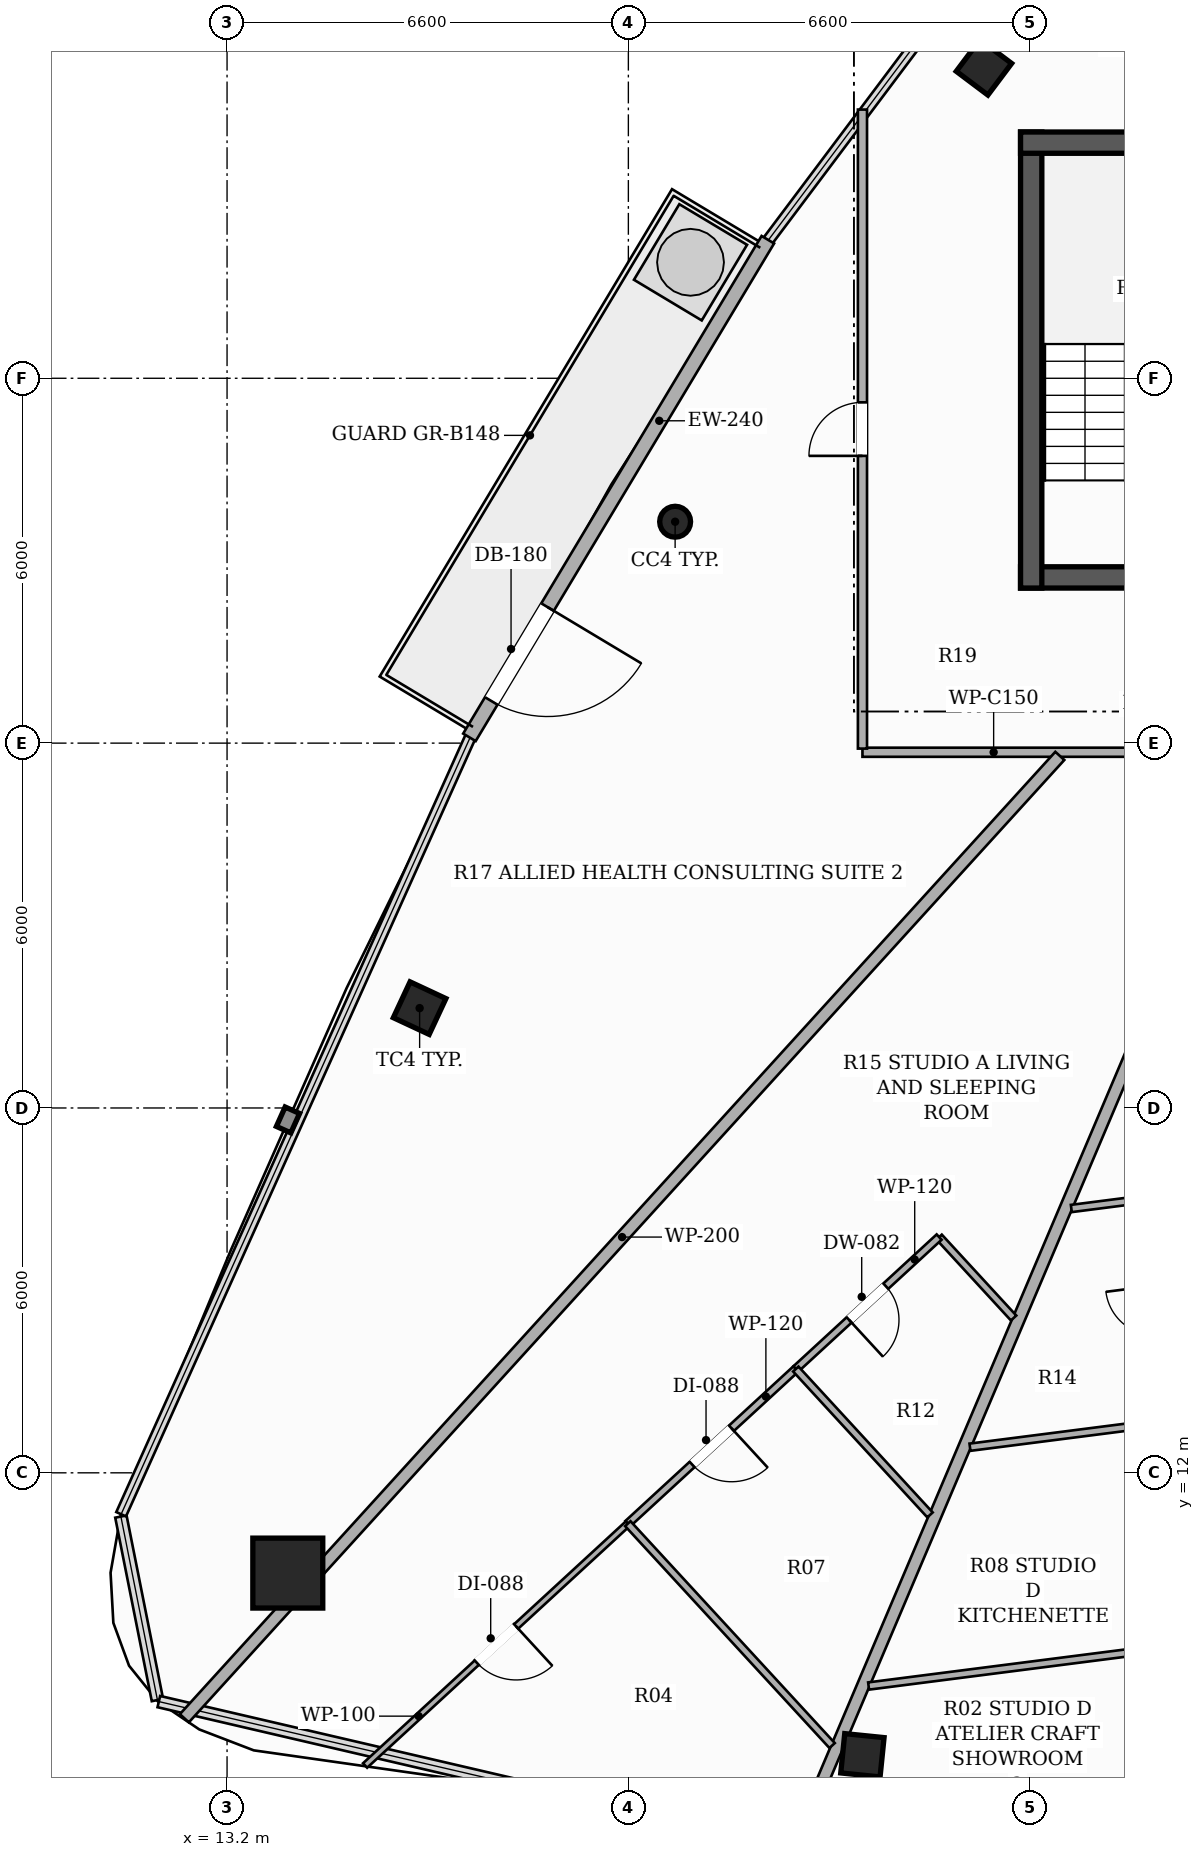
"""IFC4 building model, lengths in metres.
Left out: names, types, materials, properties, quantities, classifications, styles, units other than length and angle.
Written with IfcOpenShell. Run it as: python <this file> out.ifc"""

import sys

from ifc_helpers import new_model, si_unit, direction, frame, frame_2d, origin, origin_2d, place, context, subcontext, project, spatial, rectangle, hollow_rectangle, hollow_circle, extrude, element, fill, save


model = new_model("IFC4")
c1 = context("Model", 3, precision=1e-05, world=origin(), true_north=direction((0.0, 1.0)))
c2 = subcontext(c1, "Body", "Model", "MODEL_VIEW")
j1 = project(units=[si_unit("LENGTHUNIT", "METRE"), si_unit("PLANEANGLEUNIT", "RADIAN")], contexts=[c1])
p1 = place(None, origin())
s1 = spatial("IfcSite", under=j1, at=p1, CompositionType="ELEMENT")
p2 = place(p1, origin())
s2 = spatial("IfcBuilding", under=s1, at=p2, CompositionType="ELEMENT")
p3 = place(p2, frame((0.0, 0.0, 273.35)))
s3 = spatial("IfcBuildingStorey", under=s2, at=p3, CompositionType="ELEMENT", Elevation=273.35)
p4 = place(p3, frame((26.25, 26.725, 0.0), z_axis=(0.0, 0.0, 1.0), x_axis=(1.0, 0.0, 0.0)))
e1 = element("IfcWall", 1, at=p4, inside=s3, PredefinedType="SHEAR", context=c2, shape_type="SweptSolid", body=[
    extrude(rectangle(XDim=13.5, YDim=0.35, at=frame_2d((6.75, 0.0))), origin(), (0.0, 0.0, 1.0), 3.3),
])
p5 = place(p4, frame((4.35, 0.0, 0.0)))
e2 = element("IfcOpeningElement", 2, at=p5, cuts=e1, PredefinedType="OPENING", context=c2, shape_type="SweptSolid", body=[
    extrude(rectangle(XDim=1.05, YDim=2.15, at=frame_2d((0.525, 1.075))), frame((0.0, 0.185, 0.0), z_axis=(0.0, -1.0, 0.0), x_axis=(1.0, 0.0, 0.0)), (0.0, 0.0, 1.0), 0.37),
])
p6 = place(p4, frame((8.3, 0.0, 0.0)))
e3 = element("IfcOpeningElement", 3, at=p6, cuts=e1, PredefinedType="OPENING", context=c2, shape_type="SweptSolid", body=[
    extrude(rectangle(XDim=1.05, YDim=2.15, at=frame_2d((0.525, 1.075))), frame((0.0, 0.185, 0.0), z_axis=(0.0, -1.0, 0.0), x_axis=(1.0, 0.0, 0.0)), (0.0, 0.0, 1.0), 0.37),
])
p7 = place(p3, frame((26.425, 26.55, 0.0), z_axis=(0.0, 0.0, 1.0), x_axis=(0.0, 1.0, 0.0)))
e4 = element("IfcWall", 4, at=p7, inside=s3, PredefinedType="SHEAR", context=c2, shape_type="SweptSolid", body=[
    extrude(rectangle(XDim=7.5, YDim=0.35, at=frame_2d((3.75, 0.0))), origin(), (0.0, 0.0, 1.0), 3.3),
])
p8 = place(p3, frame((26.25, 33.875, 0.0), z_axis=(0.0, 0.0, 1.0), x_axis=(1.0, 0.0, 0.0)))
e5 = element("IfcWall", 5, at=p8, inside=s3, PredefinedType="SHEAR", context=c2, shape_type="SweptSolid", body=[
    extrude(rectangle(XDim=3.6, YDim=0.35, at=frame_2d((1.8, 0.0))), origin(), (0.0, 0.0, 1.0), 3.3),
])
p9 = place(p3, frame((14.199, 10.351, 0.0), z_axis=(0.0, 0.0, 1.0), x_axis=(1.0, 0.0, 0.0)))
e6 = element("IfcColumn", 6, at=p9, inside=s3, PredefinedType="COLUMN", context=c2, shape_type="SweptSolid", body=[
    extrude(hollow_rectangle(XDim=1.15, YDim=1.15, WallThickness=0.036, at=origin_2d()), origin(), (0.0, 0.0, 1.0), 3.3),
])
p10 = place(p3, frame((25.648, 35.113, 0.0), z_axis=(0.0, 0.0, 1.0), x_axis=(0.600420225326, 0.799684658487, 0.0)))
e7 = element("IfcColumn", 7, at=p10, inside=s3, PredefinedType="COLUMN", context=c2, shape_type="SweptSolid", body=[
    extrude(hollow_rectangle(XDim=0.65, YDim=0.65, WallThickness=0.022, at=origin_2d()), origin(), (0.0, 0.0, 1.0), 3.3),
])
p11 = place(p3, frame((20.569, 27.641, 0.0), z_axis=(0.0, 0.0, 1.0), x_axis=(1.0, 0.0, 0.0)))
e8 = element("IfcColumn", 8, at=p11, inside=s3, PredefinedType="COLUMN", context=c2, shape_type="SweptSolid", body=[
    extrude(hollow_circle(Radius=0.254, WallThickness=0.016, at=origin_2d()), origin(), (0.0, 0.0, 1.0), 3.3),
])
for number, where, z_axis, x_axis in (
    (9, (16.367, 19.642, 0.0), (0.0, 0.0, 1.0), (0.423, 0.906, 0.0)),
    (10, (23.649, 7.355, 0.0), (0.0, 0.0, 1.0), (-0.995, 0.101, 0.0)),
):
    element("IfcColumn", number, at=place(p3, frame(where, z_axis=z_axis, x_axis=x_axis)), inside=s3, PredefinedType="COLUMN", context=c2, shape_type="SweptSolid", body=[
        extrude(hollow_rectangle(XDim=0.65, YDim=0.65, WallThickness=0.022, at=origin_2d()), origin(), (0.0, 0.0, 1.0), 3.3),
    ])
p12 = place(p3, frame((22.094, 32.279, 0.0), z_axis=(0.0, 0.0, 1.0), x_axis=(-0.514303866757, -0.857608029719, 0.0)))
e11 = element("IfcWall", 11, at=p12, inside=s3, PredefinedType="SOLIDWALL", context=c2, shape_type="SweptSolid", body=[
    extrude(rectangle(XDim=9.543, YDim=0.24, at=frame_2d((4.771, 0.0))), origin(), (0.0, 0.0, 1.0), 2.584),
])
p13 = place(p12, frame((7.045, 0.0, 0.0)))
e12 = element("IfcOpeningElement", 12, at=p13, cuts=e11, PredefinedType="OPENING", context=c2, shape_type="SweptSolid", body=[
    extrude(rectangle(XDim=1.8, YDim=2.2, at=frame_2d((0.9, 1.1))), frame((0.0, 0.13, 0.0), z_axis=(0.0, -1.0, 0.0), x_axis=(1.0, 0.0, 0.0)), (0.0, 0.0, 1.0), 0.26),
])
p14 = place(p3, frame((32.168, 23.85, 0.0), z_axis=(0.0, 0.0, 1.0), x_axis=(-1.0, 0.0, 0.0)))
e13 = element("IfcWall", 13, at=p14, inside=s3, PredefinedType="PARTITIONING", context=c2, shape_type="SweptSolid", body=[
    extrude(rectangle(XDim=8.518, YDim=0.15, at=frame_2d((4.259, 0.0))), origin(), (0.0, 0.0, 1.0), 2.525),
])
p15 = place(p14, frame((3.183, 0.0, 0.0)))
e14 = element("IfcOpeningElement", 14, at=p15, cuts=e13, PredefinedType="OPENING", context=c2, shape_type="SweptSolid", body=[
    extrude(rectangle(XDim=0.92, YDim=2.15, at=frame_2d((0.46, 1.075))), frame((0.0, 0.085, 0.0), z_axis=(0.0, -1.0, 0.0), x_axis=(1.0, 0.0, 0.0)), (0.0, 0.0, 1.0), 0.17),
])
p16 = place(p14, frame((0.882, 0.0, 0.0)))
e15 = element("IfcOpeningElement", 15, at=p16, cuts=e13, PredefinedType="OPENING", context=c2, shape_type="SweptSolid", body=[
    extrude(rectangle(XDim=0.92, YDim=2.15, at=frame_2d((0.46, 1.075))), frame((0.0, 0.085, 0.0), z_axis=(0.0, -1.0, 0.0), x_axis=(1.0, 0.0, 0.0)), (0.0, 0.0, 1.0), 0.17),
])
p17 = place(p3, frame((23.65, 23.91, 0.0), z_axis=(0.0, 0.0, 1.0), x_axis=(0.0, 1.0, 0.0)))
e16 = element("IfcWall", 16, at=p17, inside=s3, PredefinedType="PARTITIONING", context=c2, shape_type="SweptSolid", body=[
    extrude(rectangle(XDim=10.509, YDim=0.15, at=frame_2d((5.254, 0.0))), origin(), (0.0, 0.0, 1.0), 2.452),
])
p18 = place(p17, frame((4.814, 0.0, 0.0)))
e17 = element("IfcOpeningElement", 17, at=p18, cuts=e16, PredefinedType="OPENING", context=c2, shape_type="SweptSolid", body=[
    extrude(rectangle(XDim=0.88, YDim=2.1, at=frame_2d((0.44, 1.05))), frame((0.0, 0.085, 0.0), z_axis=(0.0, -1.0, 0.0), x_axis=(1.0, 0.0, 0.0)), (0.0, 0.0, 1.0), 0.17),
])
p19 = place(p3, frame((26.896, 23.79, 0.0), z_axis=(0.0, 0.0, 1.0), x_axis=(-0.672947642337, -0.739690118004, 0.0)))
e18 = element("IfcWall", 18, at=p19, inside=s3, PredefinedType="PARTITIONING", context=c2, shape_type="SweptSolid", body=[
    extrude(rectangle(XDim=21.395, YDim=0.2, at=frame_2d((10.698, 0.0))), origin(), (0.0, 0.0, 1.0), 2.452),
])
p20 = place(p3, frame((30.152, 23.79, 0.0), z_axis=(0.0, 0.0, 1.0), x_axis=(-0.390757480658, -0.920493667175, 0.0)))
e19 = element("IfcWall", 19, at=p20, inside=s3, PredefinedType="PARTITIONING", context=c2, shape_type="SweptSolid", body=[
    extrude(rectangle(XDim=19.053, YDim=0.2, at=frame_2d((9.526, 0.0))), origin(), (0.0, 0.0, 1.0), 2.452),
])
p21 = place(p3, frame((26.136, 14.546, 0.0), z_axis=(0.0, 0.0, 1.0), x_axis=(-0.67721439392, 0.735785746443, 0.0)))
e20 = element("IfcWall", 20, at=p21, inside=s3, PredefinedType="PARTITIONING", context=c2, shape_type="SweptSolid", body=[
    extrude(rectangle(XDim=1.809, YDim=0.12, at=frame_2d((0.905, 0.0))), origin(), (0.0, 0.0, 1.0), 2.733),
])
p22 = place(p3, frame((24.911, 15.877, 0.0), z_axis=(0.0, 0.0, 1.0), x_axis=(-0.735690989841, -0.677317331438, 0.0)))
e21 = element("IfcWall", 21, at=p22, inside=s3, PredefinedType="PARTITIONING", context=c2, shape_type="SweptSolid", body=[
    extrude(rectangle(XDim=3.204, YDim=0.12, at=frame_2d((1.602, 0.0))), origin(), (0.0, 0.0, 1.0), 3.02),
])
p23 = place(p22, frame((1.192, 0.0, 0.0)))
e22 = element("IfcOpeningElement", 22, at=p23, cuts=e21, PredefinedType="OPENING", context=c2, shape_type="SweptSolid", body=[
    extrude(rectangle(XDim=0.82, YDim=2.1, at=frame_2d((0.41, 1.05))), frame((0.0, 0.07, 0.0), z_axis=(0.0, -1.0, 0.0), x_axis=(1.0, 0.0, 0.0)), (0.0, 0.0, 1.0), 0.14),
])
p24 = place(p3, frame((22.554, 13.707, 0.0), z_axis=(0.0, 0.0, 1.0), x_axis=(-0.735789751444, -0.677210042506, 0.0)))
e23 = element("IfcWall", 23, at=p24, inside=s3, PredefinedType="PARTITIONING", context=c2, shape_type="SweptSolid", body=[
    extrude(rectangle(XDim=3.755, YDim=0.12, at=frame_2d((1.877, 0.0))), origin(), (0.0, 0.0, 1.0), 2.733),
])
p25 = place(p24, frame((1.438, 0.0, 0.0)))
e24 = element("IfcOpeningElement", 24, at=p25, cuts=e23, PredefinedType="OPENING", context=c2, shape_type="SweptSolid", body=[
    extrude(rectangle(XDim=0.88, YDim=2.1, at=frame_2d((0.44, 1.05))), frame((0.0, 0.07, 0.0), z_axis=(0.0, -1.0, 0.0), x_axis=(1.0, 0.0, 0.0)), (0.0, 0.0, 1.0), 0.14),
])
p26 = place(p3, frame((19.791, 11.164, 0.0), z_axis=(0.0, 0.0, 1.0), x_axis=(-0.735787653784, -0.677212321608, 0.0)))
e25 = element("IfcWall", 25, at=p26, inside=s3, PredefinedType="PARTITIONING", context=c2, shape_type="SweptSolid", body=[
    extrude(rectangle(XDim=5.873, YDim=0.1, at=frame_2d((2.936, 0.0))), origin(), (0.0, 0.0, 1.0), 2.452),
])
p27 = place(p26, frame((2.496, 0.0, 0.0)))
e26 = element("IfcOpeningElement", 26, at=p27, cuts=e25, PredefinedType="OPENING", context=c2, shape_type="SweptSolid", body=[
    extrude(rectangle(XDim=0.88, YDim=2.1, at=frame_2d((0.44, 1.05))), frame((0.0, 0.06, 0.0), z_axis=(0.0, -1.0, 0.0), x_axis=(1.0, 0.0, 0.0)), (0.0, 0.0, 1.0), 0.12),
])
p28 = place(p3, frame((24.761, 11.308, 0.0), z_axis=(0.0, 0.0, 1.0), x_axis=(-0.677059775875, 0.735928026299, 0.0)))
e27 = element("IfcWall", 27, at=p28, inside=s3, PredefinedType="PARTITIONING", context=c2, shape_type="SweptSolid", body=[
    extrude(rectangle(XDim=3.26, YDim=0.12, at=frame_2d((1.63, 0.0))), origin(), (0.0, 0.0, 1.0), 2.733),
])
p29 = place(p3, frame((23.151, 7.515, 0.0), z_axis=(0.0, 0.0, 1.0), x_axis=(-0.677343302262, 0.735667078834, 0.0)))
e28 = element("IfcWall", 28, at=p29, inside=s3, PredefinedType="PARTITIONING", context=c2, shape_type="SweptSolid", body=[
    extrude(rectangle(XDim=4.96, YDim=0.12, at=frame_2d((2.48, 0.0))), origin(), (0.0, 0.0, 1.0), 2.452),
])
p30 = place(p3, frame((28.285, 16.501, 0.0), z_axis=(0.0, 0.0, 1.0), x_axis=(-0.991859459137, -0.127337399535, 0.0)))
e29 = element("IfcWall", 29, at=p30, inside=s3, PredefinedType="PARTITIONING", context=c2, shape_type="SweptSolid", body=[
    extrude(rectangle(XDim=1.21, YDim=0.12, at=frame_2d((0.605, 0.0))), origin(), (0.0, 0.0, 1.0), 3.02),
])
p31 = place(p3, frame((28.753, 12.848, 0.0), z_axis=(0.0, 0.0, 1.0), x_axis=(-0.991902552373, -0.127001285805, 0.0)))
e30 = element("IfcWall", 30, at=p31, inside=s3, PredefinedType="PARTITIONING", context=c2, shape_type="SweptSolid", body=[
    extrude(rectangle(XDim=3.362, YDim=0.12, at=frame_2d((1.681, 0.0))), origin(), (0.0, 0.0, 1.0), 2.733),
])
p32 = place(p3, frame((29.222, 9.195, 0.0), z_axis=(0.0, 0.0, 1.0), x_axis=(-0.991886960484, -0.127123001942, 0.0)))
e31 = element("IfcWall", 31, at=p32, inside=s3, PredefinedType="PARTITIONING", context=c2, shape_type="SweptSolid", body=[
    extrude(rectangle(XDim=5.516, YDim=0.12, at=frame_2d((2.758, 0.0))), origin(), (0.0, 0.0, 1.0), 2.733),
])
p33 = place(p13, origin())
e32 = element("IfcDoor", 32, at=p33, inside=s3, OperationType="SINGLE_SWING_LEFT", PredefinedType="DOOR", context=c2, shape_type="SweptSolid", body=[
    extrude(rectangle(XDim=1.8, YDim=2.2, at=frame_2d((0.9, 1.1))), frame((0.0, 0.025, 0.0), z_axis=(0.0, -1.0, 0.0), x_axis=(1.0, 0.0, 0.0)), (0.0, 0.0, 1.0), 0.05),
])
fill(e12, e32)
p34 = place(p18, origin())
e33 = element("IfcDoor", 33, at=p34, inside=s3, OperationType="SINGLE_SWING_LEFT", PredefinedType="DOOR", context=c2, shape_type="SweptSolid", body=[
    extrude(rectangle(XDim=0.88, YDim=2.1, at=frame_2d((0.44, 1.05))), frame((0.0, 0.025, 0.0), z_axis=(0.0, -1.0, 0.0), x_axis=(1.0, 0.0, 0.0)), (0.0, 0.0, 1.0), 0.05),
])
fill(e17, e33)
p35 = place(p23, origin())
e34 = element("IfcDoor", 34, at=p35, inside=s3, OperationType="SINGLE_SWING_RIGHT", PredefinedType="DOOR", context=c2, shape_type="SweptSolid", body=[
    extrude(rectangle(XDim=0.82, YDim=2.1, at=frame_2d((0.41, 1.05))), frame((0.0, 0.025, 0.0), z_axis=(0.0, -1.0, 0.0), x_axis=(1.0, 0.0, 0.0)), (0.0, 0.0, 1.0), 0.05),
])
fill(e22, e34)
p36 = place(p25, origin())
e35 = element("IfcDoor", 35, at=p36, inside=s3, OperationType="SINGLE_SWING_LEFT", PredefinedType="DOOR", context=c2, shape_type="SweptSolid", body=[
    extrude(rectangle(XDim=0.88, YDim=2.1, at=frame_2d((0.44, 1.05))), frame((0.0, 0.025, 0.0), z_axis=(0.0, -1.0, 0.0), x_axis=(1.0, 0.0, 0.0)), (0.0, 0.0, 1.0), 0.05),
])
fill(e24, e35)
p37 = place(p27, origin())
e36 = element("IfcDoor", 36, at=p37, inside=s3, OperationType="SINGLE_SWING_LEFT", PredefinedType="DOOR", context=c2, shape_type="SweptSolid", body=[
    extrude(rectangle(XDim=0.88, YDim=2.1, at=frame_2d((0.44, 1.05))), frame((0.0, 0.025, 0.0), z_axis=(0.0, -1.0, 0.0), x_axis=(1.0, 0.0, 0.0)), (0.0, 0.0, 1.0), 0.05),
])
fill(e26, e36)
save(model, sys.argv[1])
